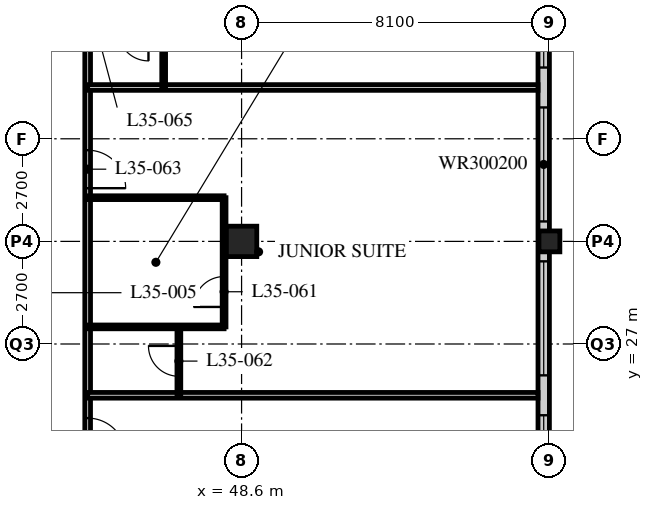
"""IFC4 building model, lengths in metres.
Left out: names, types, materials, properties, quantities, classifications, styles, units other than length and angle.
Written with IfcOpenShell. Run it as: python <this file> out.ifc"""

import sys

from ifc_helpers import new_model, si_unit, direction, frame, frame_2d, origin, origin_2d, place, context, subcontext, project, spatial, rectangle, hollow_rectangle, extrude, element, fill, save


model = new_model("IFC4")
c1 = context("Model", 3, precision=1e-05, world=origin(), true_north=direction((0.0, 1.0)))
c2 = subcontext(c1, "Body", "Model", "MODEL_VIEW")
j1 = project(units=[si_unit("LENGTHUNIT", "METRE"), si_unit("PLANEANGLEUNIT", "RADIAN")], contexts=[c1])
p1 = place(None, origin())
s1 = spatial("IfcSite", under=j1, at=p1, CompositionType="ELEMENT")
p2 = place(p1, origin())
s2 = spatial("IfcBuilding", under=s1, at=p2, CompositionType="ELEMENT")
p3 = place(p2, frame((0.0, 0.0, 137.4)))
s3 = spatial("IfcBuildingStorey", under=s2, at=p3, CompositionType="ELEMENT", Elevation=137.4)
p4 = place(p3, frame((48.6, 29.7, 0.0), z_axis=(0.0, 0.0, 1.0), x_axis=(1.0, 0.0, 0.0)))
e1 = element("IfcColumn", 1, at=p4, inside=s3, PredefinedType="COLUMN", context=c2, shape_type="SweptSolid", body=[
    extrude(hollow_rectangle(XDim=0.8, YDim=0.8, WallThickness=0.08, at=origin_2d()), origin(), (0.0, 0.0, 1.0), 3.4),
])
p5 = place(p3, frame((56.7, 29.7, 0.0), z_axis=(0.0, 0.0, 1.0), x_axis=(1.0, 0.0, 0.0)))
e2 = element("IfcColumn", 2, at=p5, inside=s3, PredefinedType="COLUMN", context=c2, shape_type="SweptSolid", body=[
    extrude(hollow_rectangle(XDim=0.55, YDim=0.55, WallThickness=0.04, at=origin_2d()), origin(), (0.0, 0.0, 1.0), 3.4),
])
p6 = place(p3, frame((56.55, 13.8, 0.0), z_axis=(0.0, 0.0, 1.0), x_axis=(0.0, 1.0, 0.0)))
e3 = element("IfcWall", 3, at=p6, inside=s3, PredefinedType="SOLIDWALL", context=c2, shape_type="SweptSolid", body=[
    extrude(rectangle(XDim=32.1, YDim=0.3, at=frame_2d((16.05, 0.0))), origin(), (0.0, 0.0, 1.0), 3.19),
])
p7 = place(p6, frame((0.225, 0.0, 0.9)))
e4 = element("IfcOpeningElement", 4, at=p7, cuts=e3, PredefinedType="OPENING", context=c2, shape_type="SweptSolid", body=[
    extrude(rectangle(XDim=3.0, YDim=2.0, at=frame_2d((1.5, 1.0))), frame((0.0, 0.16, 0.0), z_axis=(0.0, -1.0, 0.0), x_axis=(1.0, 0.0, 0.0)), (0.0, 0.0, 1.0), 0.32),
])
p8 = place(p6, frame((4.275, 0.0, 0.9)))
e5 = element("IfcOpeningElement", 5, at=p8, cuts=e3, PredefinedType="OPENING", context=c2, shape_type="SweptSolid", body=[
    extrude(rectangle(XDim=3.0, YDim=2.0, at=frame_2d((1.5, 1.0))), frame((0.0, 0.16, 0.0), z_axis=(0.0, -1.0, 0.0), x_axis=(1.0, 0.0, 0.0)), (0.0, 0.0, 1.0), 0.32),
])
p9 = place(p6, frame((8.325, 0.0, 0.9)))
e6 = element("IfcOpeningElement", 6, at=p9, cuts=e3, PredefinedType="OPENING", context=c2, shape_type="SweptSolid", body=[
    extrude(rectangle(XDim=3.0, YDim=2.0, at=frame_2d((1.5, 1.0))), frame((0.0, 0.16, 0.0), z_axis=(0.0, -1.0, 0.0), x_axis=(1.0, 0.0, 0.0)), (0.0, 0.0, 1.0), 0.32),
])
p10 = place(p6, frame((12.375, 0.0, 0.9)))
e7 = element("IfcOpeningElement", 7, at=p10, cuts=e3, PredefinedType="OPENING", context=c2, shape_type="SweptSolid", body=[
    extrude(rectangle(XDim=3.0, YDim=2.0, at=frame_2d((1.5, 1.0))), frame((0.0, 0.16, 0.0), z_axis=(0.0, -1.0, 0.0), x_axis=(1.0, 0.0, 0.0)), (0.0, 0.0, 1.0), 0.32),
])
p11 = place(p6, frame((16.425, 0.0, 0.9)))
e8 = element("IfcOpeningElement", 8, at=p11, cuts=e3, PredefinedType="OPENING", context=c2, shape_type="SweptSolid", body=[
    extrude(rectangle(XDim=3.0, YDim=2.0, at=frame_2d((1.5, 1.0))), frame((0.0, 0.16, 0.0), z_axis=(0.0, -1.0, 0.0), x_axis=(1.0, 0.0, 0.0)), (0.0, 0.0, 1.0), 0.32),
])
p12 = place(p6, frame((20.475, 0.0, 0.9)))
e9 = element("IfcOpeningElement", 9, at=p12, cuts=e3, PredefinedType="OPENING", context=c2, shape_type="SweptSolid", body=[
    extrude(rectangle(XDim=3.0, YDim=2.0, at=frame_2d((1.5, 1.0))), frame((0.0, 0.16, 0.0), z_axis=(0.0, -1.0, 0.0), x_axis=(1.0, 0.0, 0.0)), (0.0, 0.0, 1.0), 0.32),
])
p13 = place(p6, frame((24.525, 0.0, 0.9)))
e10 = element("IfcOpeningElement", 10, at=p13, cuts=e3, PredefinedType="OPENING", context=c2, shape_type="SweptSolid", body=[
    extrude(rectangle(XDim=3.0, YDim=2.0, at=frame_2d((1.5, 1.0))), frame((0.0, 0.16, 0.0), z_axis=(0.0, -1.0, 0.0), x_axis=(1.0, 0.0, 0.0)), (0.0, 0.0, 1.0), 0.32),
])
p14 = place(p6, frame((28.575, 0.0, 0.9)))
e11 = element("IfcOpeningElement", 11, at=p14, cuts=e3, PredefinedType="OPENING", context=c2, shape_type="SweptSolid", body=[
    extrude(rectangle(XDim=3.0, YDim=2.0, at=frame_2d((1.5, 1.0))), frame((0.0, 0.16, 0.0), z_axis=(0.0, -1.0, 0.0), x_axis=(1.0, 0.0, 0.0)), (0.0, 0.0, 1.0), 0.32),
])
p15 = place(p3, frame((44.55, 17.55, 0.0), z_axis=(0.0, 0.0, 1.0), x_axis=(0.0, 1.0, 0.0)))
e12 = element("IfcWall", 12, at=p15, inside=s3, PredefinedType="PARTITIONING", context=c2, shape_type="SweptSolid", body=[
    extrude(rectangle(XDim=28.35, YDim=0.15, at=frame_2d((14.175, 0.0))), origin(), (0.0, 0.0, 1.0), 3.19),
])
p16 = place(p15, frame((2.75, 0.0, 0.0)))
e13 = element("IfcOpeningElement", 13, at=p16, cuts=e12, PredefinedType="OPENING", context=c2, shape_type="SweptSolid", body=[
    extrude(rectangle(XDim=1.0, YDim=2.1, at=frame_2d((0.5, 1.05))), frame((0.0, 0.085, 0.0), z_axis=(0.0, -1.0, 0.0), x_axis=(1.0, 0.0, 0.0)), (0.0, 0.0, 1.0), 0.17),
])
p17 = place(p15, frame((6.5, 0.0, 0.0)))
e14 = element("IfcOpeningElement", 14, at=p17, cuts=e12, PredefinedType="OPENING", context=c2, shape_type="SweptSolid", body=[
    extrude(rectangle(XDim=1.0, YDim=2.1, at=frame_2d((0.5, 1.05))), frame((0.0, 0.085, 0.0), z_axis=(0.0, -1.0, 0.0), x_axis=(1.0, 0.0, 0.0)), (0.0, 0.0, 1.0), 0.17),
])
p18 = place(p15, frame((13.55, 0.0, 0.0)))
e15 = element("IfcOpeningElement", 15, at=p18, cuts=e12, PredefinedType="OPENING", context=c2, shape_type="SweptSolid", body=[
    extrude(rectangle(XDim=1.0, YDim=2.1, at=frame_2d((0.5, 1.05))), frame((0.0, 0.085, 0.0), z_axis=(0.0, -1.0, 0.0), x_axis=(1.0, 0.0, 0.0)), (0.0, 0.0, 1.0), 0.17),
])
p19 = place(p15, frame((18.1, 0.0, 0.0)))
e16 = element("IfcOpeningElement", 16, at=p19, cuts=e12, PredefinedType="OPENING", context=c2, shape_type="SweptSolid", body=[
    extrude(rectangle(XDim=1.0, YDim=2.1, at=frame_2d((0.5, 1.05))), frame((0.0, 0.085, 0.0), z_axis=(0.0, -1.0, 0.0), x_axis=(1.0, 0.0, 0.0)), (0.0, 0.0, 1.0), 0.17),
])
p20 = place(p15, frame((26.75, 0.0, 0.0)))
e17 = element("IfcOpeningElement", 17, at=p20, cuts=e12, PredefinedType="OPENING", context=c2, shape_type="SweptSolid", body=[
    extrude(rectangle(XDim=1.0, YDim=2.1, at=frame_2d((0.5, 1.05))), frame((0.0, 0.085, 0.0), z_axis=(0.0, -1.0, 0.0), x_axis=(1.0, 0.0, 0.0)), (0.0, 0.0, 1.0), 0.17),
])
p21 = place(p3, frame((44.55, 25.65, 0.0), z_axis=(0.0, 0.0, 1.0), x_axis=(1.0, 0.0, 0.0)))
e18 = element("IfcWall", 18, at=p21, inside=s3, PredefinedType="PARTITIONING", context=c2, shape_type="SweptSolid", body=[
    extrude(rectangle(XDim=11.85, YDim=0.15, at=frame_2d((5.925, 0.0))), origin(), (0.0, 0.0, 1.0), 3.19),
])
p22 = place(p3, frame((48.14, 27.45, 0.0), z_axis=(0.0, 0.0, 1.0), x_axis=(0.0, 1.0, 0.0)))
e19 = element("IfcWall", 19, at=p22, inside=s3, PredefinedType="PARTITIONING", context=c2, shape_type="SweptSolid", body=[
    extrude(rectangle(XDim=3.4, YDim=0.1, at=frame_2d((1.7, 0.0))), origin(), (0.0, 0.0, 1.0), 3.19),
])
p23 = place(p22, frame((0.525, 0.0, 0.0)))
e20 = element("IfcOpeningElement", 20, at=p23, cuts=e19, PredefinedType="OPENING", context=c2, shape_type="SweptSolid", body=[
    extrude(rectangle(XDim=0.8, YDim=2.1, at=frame_2d((0.4, 1.05))), frame((0.0, 0.06, 0.0), z_axis=(0.0, -1.0, 0.0), x_axis=(1.0, 0.0, 0.0)), (0.0, 0.0, 1.0), 0.12),
])
p24 = place(p3, frame((46.95, 25.65, 0.0), z_axis=(0.0, 0.0, 1.0), x_axis=(0.0, 1.0, 0.0)))
e21 = element("IfcWall", 21, at=p24, inside=s3, PredefinedType="PARTITIONING", context=c2, shape_type="SweptSolid", body=[
    extrude(rectangle(XDim=1.8, YDim=0.1, at=frame_2d((0.9, 0.0))), origin(), (0.0, 0.0, 1.0), 3.19),
])
p25 = place(p24, frame((0.5, 0.0, 0.0)))
e22 = element("IfcOpeningElement", 22, at=p25, cuts=e21, PredefinedType="OPENING", context=c2, shape_type="SweptSolid", body=[
    extrude(rectangle(XDim=0.8, YDim=2.1, at=frame_2d((0.4, 1.05))), frame((0.0, 0.06, 0.0), z_axis=(0.0, -1.0, 0.0), x_axis=(1.0, 0.0, 0.0)), (0.0, 0.0, 1.0), 0.12),
])
for number, where, z_axis, x_axis in (
    (23, (44.55, 27.45, 0.0), (0.0, 0.0, 1.0), (1.0, 0.0, 0.0)),
    (24, (44.55, 30.85, 0.0), (0.0, 0.0, 1.0), (1.0, 0.0, 0.0)),
):
    element("IfcWall", number, at=place(p3, frame(where, z_axis=z_axis, x_axis=x_axis)), inside=s3, PredefinedType="PARTITIONING", context=c2, shape_type="SweptSolid", body=[
        extrude(rectangle(XDim=3.59, YDim=0.1, at=frame_2d((1.795, 0.0))), origin(), (0.0, 0.0, 1.0), 3.19),
    ])
p26 = place(p3, frame((44.55, 33.75, 0.0), z_axis=(0.0, 0.0, 1.0), x_axis=(1.0, 0.0, 0.0)))
e25 = element("IfcWall", 25, at=p26, inside=s3, PredefinedType="PARTITIONING", context=c2, shape_type="SweptSolid", body=[
    extrude(rectangle(XDim=11.85, YDim=0.15, at=frame_2d((5.925, 0.0))), origin(), (0.0, 0.0, 1.0), 3.19),
])
p27 = place(p3, frame((46.55, 33.75, 0.0), z_axis=(0.0, 0.0, 1.0), x_axis=(0.0, 1.0, 0.0)))
e26 = element("IfcWall", 26, at=p27, inside=s3, PredefinedType="PARTITIONING", context=c2, shape_type="SweptSolid", body=[
    extrude(rectangle(XDim=1.5, YDim=0.1, at=frame_2d((0.75, 0.0))), origin(), (0.0, 0.0, 1.0), 3.19),
])
p28 = place(p9, origin())
e27 = element("IfcWindow", 27, at=p28, inside=s3, PartitioningType="SINGLE_PANEL", PredefinedType="WINDOW", context=c2, shape_type="SweptSolid", body=[
    extrude(rectangle(XDim=3.0, YDim=2.0, at=frame_2d((1.5, 1.0))), frame((0.0, 0.03, 0.0), z_axis=(0.0, -1.0, 0.0), x_axis=(1.0, 0.0, 0.0)), (0.0, 0.0, 1.0), 0.06),
])
fill(e6, e27)
p29 = place(p10, origin())
e28 = element("IfcWindow", 28, at=p29, inside=s3, PartitioningType="SINGLE_PANEL", PredefinedType="WINDOW", context=c2, shape_type="SweptSolid", body=[
    extrude(rectangle(XDim=3.0, YDim=2.0, at=frame_2d((1.5, 1.0))), frame((0.0, 0.03, 0.0), z_axis=(0.0, -1.0, 0.0), x_axis=(1.0, 0.0, 0.0)), (0.0, 0.0, 1.0), 0.06),
])
fill(e7, e28)
p30 = place(p11, origin())
e29 = element("IfcWindow", 29, at=p30, inside=s3, PartitioningType="SINGLE_PANEL", PredefinedType="WINDOW", context=c2, shape_type="SweptSolid", body=[
    extrude(rectangle(XDim=3.0, YDim=2.0, at=frame_2d((1.5, 1.0))), frame((0.0, 0.03, 0.0), z_axis=(0.0, -1.0, 0.0), x_axis=(1.0, 0.0, 0.0)), (0.0, 0.0, 1.0), 0.06),
])
fill(e8, e29)
p31 = place(p12, origin())
e30 = element("IfcWindow", 30, at=p31, inside=s3, PartitioningType="SINGLE_PANEL", PredefinedType="WINDOW", context=c2, shape_type="SweptSolid", body=[
    extrude(rectangle(XDim=3.0, YDim=2.0, at=frame_2d((1.5, 1.0))), frame((0.0, 0.03, 0.0), z_axis=(0.0, -1.0, 0.0), x_axis=(1.0, 0.0, 0.0)), (0.0, 0.0, 1.0), 0.06),
])
fill(e9, e30)
p32 = place(p17, origin())
e31 = element("IfcDoor", 31, at=p32, inside=s3, OperationType="SINGLE_SWING_RIGHT", PredefinedType="DOOR", context=c2, shape_type="SweptSolid", body=[
    extrude(rectangle(XDim=1.0, YDim=2.1, at=frame_2d((0.5, 1.05))), frame((0.0, 0.025, 0.0), z_axis=(0.0, -1.0, 0.0), x_axis=(1.0, 0.0, 0.0)), (0.0, 0.0, 1.0), 0.05),
])
fill(e14, e31)
p33 = place(p23, origin())
e32 = element("IfcDoor", 32, at=p33, inside=s3, OperationType="SINGLE_SWING_LEFT", PredefinedType="DOOR", context=c2, shape_type="SweptSolid", body=[
    extrude(rectangle(XDim=0.8, YDim=2.1, at=frame_2d((0.4, 1.05))), frame((0.0, 0.025, 0.0), z_axis=(0.0, -1.0, 0.0), x_axis=(1.0, 0.0, 0.0)), (0.0, 0.0, 1.0), 0.05),
])
fill(e20, e32)
p34 = place(p25, origin())
e33 = element("IfcDoor", 33, at=p34, inside=s3, OperationType="SINGLE_SWING_RIGHT", PredefinedType="DOOR", context=c2, shape_type="SweptSolid", body=[
    extrude(rectangle(XDim=0.8, YDim=2.1, at=frame_2d((0.4, 1.05))), frame((0.0, 0.025, 0.0), z_axis=(0.0, -1.0, 0.0), x_axis=(1.0, 0.0, 0.0)), (0.0, 0.0, 1.0), 0.05),
])
fill(e22, e33)
p35 = place(p18, origin())
e34 = element("IfcDoor", 34, at=p35, inside=s3, OperationType="SINGLE_SWING_RIGHT", PredefinedType="DOOR", context=c2, shape_type="SweptSolid", body=[
    extrude(rectangle(XDim=1.0, YDim=2.1, at=frame_2d((0.5, 1.05))), frame((0.0, 0.025, 0.0), z_axis=(0.0, -1.0, 0.0), x_axis=(1.0, 0.0, 0.0)), (0.0, 0.0, 1.0), 0.05),
])
fill(e15, e34)
save(model, sys.argv[1])
